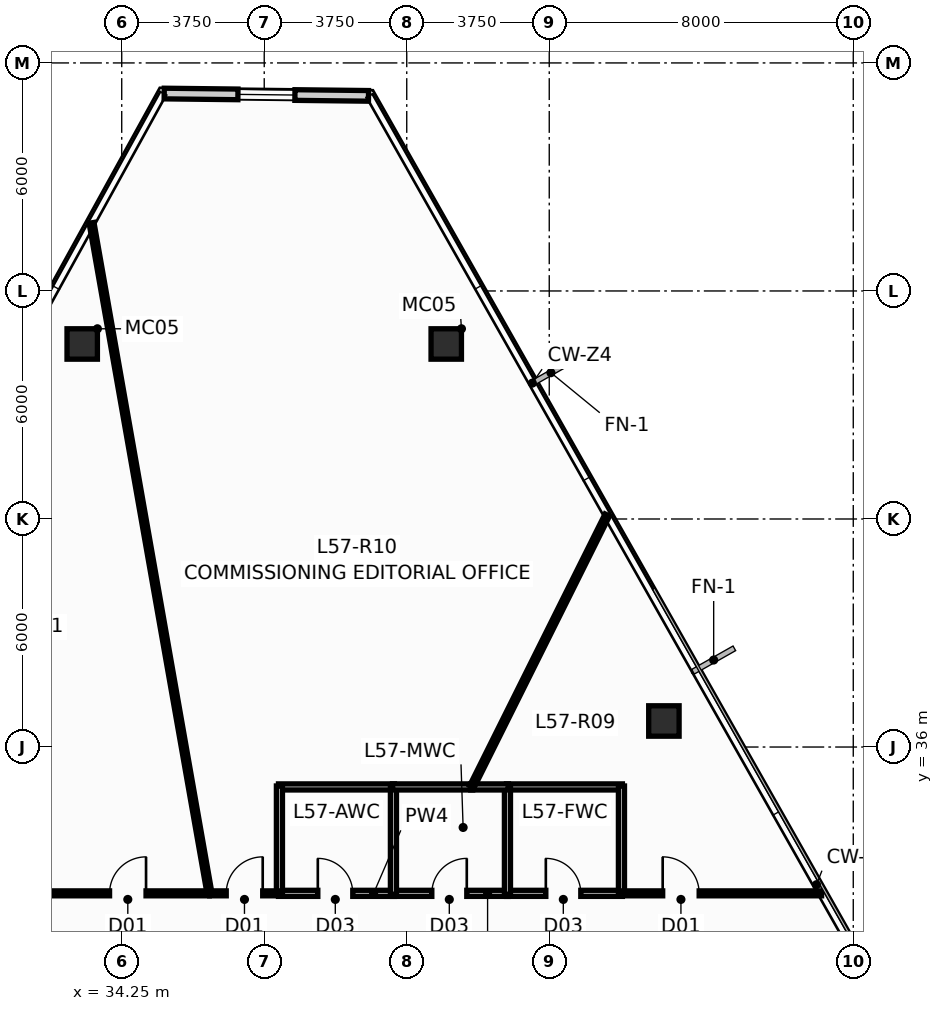
"""IFC4 building model, lengths in metres.
Left out: names, types, materials, properties, quantities, classifications, styles, units other than length and angle.
Written with IfcOpenShell. Run it as: python <this file> out.ifc"""

import sys

from ifc_helpers import new_model, si_unit, direction, frame, frame_2d, origin, origin_2d, place, context, subcontext, project, spatial, rectangle, hollow_rectangle, extrude, source, transform, mapped, element, fill, save


model = new_model("IFC4")
c1 = context("Model", 3, precision=1e-05, world=origin(), true_north=direction((0.0, 1.0)))
c2 = subcontext(c1, "Body", "Model", "MODEL_VIEW")
j1 = project(units=[si_unit("LENGTHUNIT", "METRE"), si_unit("PLANEANGLEUNIT", "RADIAN")], contexts=[c1])
p1 = place(None, origin())
s1 = spatial("IfcSite", under=j1, at=p1, CompositionType="ELEMENT")
p2 = place(p1, origin())
s2 = spatial("IfcBuilding", under=s1, at=p2, CompositionType="ELEMENT")
p3 = place(p2, frame((0.0, 0.0, 216.9)))
s3 = spatial("IfcBuildingStorey", under=s2, at=p3, CompositionType="ELEMENT", Elevation=216.9)
m1 = source(origin(), c2, "Body", "SweptSolid", [
    extrude(hollow_rectangle(XDim=0.8, YDim=0.8, WallThickness=0.045, at=origin_2d()), origin(), (0.0, 0.0, 1.0), 3.651),
])
for number, where, z_axis, x_axis in (
    (1, (42.79, 46.605, 0.0), (-0.024, 0.002, 1.0), (-0.073, -0.997, 0.0)),
    (2, (33.21, 46.605, 0.0), (0.024, 0.002, 1.0), (-0.073, 0.997, 0.0)),
):
    element("IfcColumn", number, at=place(p3, frame(where, z_axis=z_axis, x_axis=x_axis)), inside=s3, PredefinedType="COLUMN", context=c2, shape_type="MappedRepresentation", body=[
        mapped(m1, transform((0.0, 0.0, 0.0), scale=1.0)),
    ])
m2 = source(origin(), c2, "Body", "SweptSolid", [
    extrude(hollow_rectangle(XDim=0.8, YDim=0.8, WallThickness=0.045, at=origin_2d()), origin(), (0.0, 0.0, 1.0), 3.651),
])
p4 = place(p3, frame((48.517, 36.685, 0.0), z_axis=(-0.019392689002, -0.006085292066, 0.99979342508), x_axis=(0.299398805134, -0.954128060317, 0.0)))
e3 = element("IfcColumn", 3, at=p4, inside=s3, PredefinedType="COLUMN", context=c2, shape_type="MappedRepresentation", body=[
    mapped(m2, transform((0.0, 0.0, 0.0), scale=1.0)),
])
p5 = place(p3, frame((35.368, 53.195, 0.0), z_axis=(0.0, 0.0, 1.0), x_axis=(0.999935040825, -0.011397987977, 0.0)))
e4 = element("IfcWall", 4, at=p5, inside=s3, PredefinedType="STANDARD", context=c2, shape_type="SweptSolid", body=[
    extrude(rectangle(XDim=5.376, YDim=0.28, at=frame_2d((2.688, 0.0))), origin(), (0.0, 0.0, 1.0), 3.25),
])
p6 = place(p5, frame((1.94, 0.0, 0.9)))
e5 = element("IfcOpeningElement", 5, at=p6, cuts=e4, PredefinedType="OPENING", context=c2, shape_type="SweptSolid", body=[
    extrude(rectangle(XDim=1.5, YDim=1.8, at=frame_2d((0.75, 0.9))), frame((0.0, 0.152, 0.0), z_axis=(0.0, -1.0, 0.0), x_axis=(1.0, 0.0, 0.0)), (0.0, 0.0, 1.0), 0.304),
])
p7 = place(p3, frame((38.375, 32.15, 0.0), z_axis=(0.0, 0.0, 1.0), x_axis=(1.0, 0.0, 0.0)))
e6 = element("IfcWall", 6, at=p7, inside=s3, PredefinedType="PLUMBINGWALL", context=c2, shape_type="SweptSolid", body=[
    extrude(rectangle(XDim=3.05, YDim=0.16, at=frame_2d((1.525, 0.0))), origin(), (0.0, 0.0, 1.0), 2.928),
])
p8 = place(p7, frame((1.035, 0.0, 0.0)))
e7 = element("IfcOpeningElement", 7, at=p8, cuts=e6, PredefinedType="OPENING", context=c2, shape_type="SweptSolid", body=[
    extrude(rectangle(XDim=0.92, YDim=2.1, at=frame_2d((0.46, 1.05))), frame((0.0, 0.092, 0.0), z_axis=(0.0, -1.0, 0.0), x_axis=(1.0, 0.0, 0.0)), (0.0, 0.0, 1.0), 0.184),
])
p9 = place(p3, frame((41.375, 32.15, 0.0), z_axis=(0.0, 0.0, 1.0), x_axis=(1.0, 0.0, 0.0)))
e8 = element("IfcWall", 8, at=p9, inside=s3, PredefinedType="PLUMBINGWALL", context=c2, shape_type="SweptSolid", body=[
    extrude(rectangle(XDim=3.05, YDim=0.16, at=frame_2d((1.525, 0.0))), origin(), (0.0, 0.0, 1.0), 2.928),
])
p10 = place(p9, frame((1.035, 0.0, 0.0)))
e9 = element("IfcOpeningElement", 9, at=p10, cuts=e8, PredefinedType="OPENING", context=c2, shape_type="SweptSolid", body=[
    extrude(rectangle(XDim=0.92, YDim=2.1, at=frame_2d((0.46, 1.05))), frame((0.0, 0.092, 0.0), z_axis=(0.0, -1.0, 0.0), x_axis=(1.0, 0.0, 0.0)), (0.0, 0.0, 1.0), 0.184),
])
p11 = place(p3, frame((44.375, 32.15, 0.0), z_axis=(0.0, 0.0, 1.0), x_axis=(1.0, 0.0, 0.0)))
e10 = element("IfcWall", 10, at=p11, inside=s3, PredefinedType="PLUMBINGWALL", context=c2, shape_type="SweptSolid", body=[
    extrude(rectangle(XDim=3.05, YDim=0.16, at=frame_2d((1.525, 0.0))), origin(), (0.0, 0.0, 1.0), 2.928),
])
p12 = place(p11, frame((1.035, 0.0, 0.0)))
e11 = element("IfcOpeningElement", 11, at=p12, cuts=e10, PredefinedType="OPENING", context=c2, shape_type="SweptSolid", body=[
    extrude(rectangle(XDim=0.92, YDim=2.1, at=frame_2d((0.46, 1.05))), frame((0.0, 0.092, 0.0), z_axis=(0.0, -1.0, 0.0), x_axis=(1.0, 0.0, 0.0)), (0.0, 0.0, 1.0), 0.184),
])
for number, where, z_axis, x_axis in (
    (12, (38.375, 34.95, 0.0), (0.0, 0.0, 1.0), (1.0, 0.0, 0.0)),
    (13, (47.425, 34.95, 0.0), (0.0, 0.0, 1.0), (-1.0, 0.0, 0.0)),
):
    element("IfcWall", number, at=place(p3, frame(where, z_axis=z_axis, x_axis=x_axis)), inside=s3, PredefinedType="PLUMBINGWALL", context=c2, shape_type="SweptSolid", body=[
        extrude(rectangle(XDim=3.05, YDim=0.16, at=frame_2d((1.525, 0.0))), origin(), (0.0, 0.0, 1.0), 2.928),
    ])
for number, where, z_axis, x_axis in (
    (14, (41.4, 32.125, 0.0), (0.0, 0.0, 1.0), (0.0, 1.0, 0.0)),
    (15, (38.4, 32.125, 0.0), (0.0, 0.0, 1.0), (0.0, 1.0, 0.0)),
):
    element("IfcWall", number, at=place(p3, frame(where, z_axis=z_axis, x_axis=x_axis)), inside=s3, PredefinedType="PLUMBINGWALL", context=c2, shape_type="SweptSolid", body=[
        extrude(rectangle(XDim=2.85, YDim=0.16, at=frame_2d((1.425, 0.0))), origin(), (0.0, 0.0, 1.0), 3.25),
    ])
p13 = place(p3, frame((44.4, 32.125, 0.0), z_axis=(0.0, 0.0, 1.0), x_axis=(0.0, 1.0, 0.0)))
e16 = element("IfcWall", 16, at=p13, inside=s3, PredefinedType="PLUMBINGWALL", context=c2, shape_type="SweptSolid", body=[
    extrude(rectangle(XDim=2.85, YDim=0.16, at=frame_2d((1.425, 0.0))), origin(), (0.0, 0.0, 1.0), 2.775),
])
p14 = place(p3, frame((47.4, 32.125, 0.0), z_axis=(0.0, 0.0, 1.0), x_axis=(0.0, 1.0, 0.0)))
e17 = element("IfcWall", 17, at=p14, inside=s3, PredefinedType="PLUMBINGWALL", context=c2, shape_type="SweptSolid", body=[
    extrude(rectangle(XDim=2.85, YDim=0.16, at=frame_2d((1.425, 0.0))), origin(), (0.0, 0.0, 1.0), 3.25),
])
p15 = place(p3, frame((41.375, 34.95, 0.0), z_axis=(0.0, 0.0, 1.0), x_axis=(1.0, 0.0, 0.0)))
e18 = element("IfcWall", 18, at=p15, inside=s3, PredefinedType="PLUMBINGWALL", context=c2, shape_type="SweptSolid", body=[
    extrude(rectangle(XDim=2.11, YDim=0.16, at=frame_2d((1.055, 0.0))), origin(), (0.0, 0.0, 1.0), 2.928),
])
p16 = place(p3, frame((43.435, 34.95, 0.0), z_axis=(0.0, 0.0, 1.0), x_axis=(1.0, 0.0, 0.0)))
e19 = element("IfcWall", 19, at=p16, inside=s3, PredefinedType="PLUMBINGWALL", context=c2, shape_type="SweptSolid", body=[
    extrude(rectangle(XDim=0.99, YDim=0.16, at=frame_2d((0.495, 0.0))), origin(), (0.0, 0.0, 1.0), 2.928),
])
p17 = place(p3, frame((33.456, 49.792, 0.0), z_axis=(0.0, 0.0, 1.0), x_axis=(0.173275126194, -0.984873459203, 0.0)))
e20 = element("IfcWall", 20, at=p17, inside=s3, PredefinedType="PARTITIONING", context=c2, shape_type="SweptSolid", body=[
    extrude(rectangle(XDim=17.908, YDim=0.13, at=frame_2d((8.954, 0.0))), origin(), (0.0, 0.0, 1.0), 3.25),
])
p18 = place(p3, frame((43.462, 34.954, 0.0), z_axis=(0.0, 0.0, 1.0), x_axis=(0.446235545648, 0.894915547859, 0.0)))
e21 = element("IfcWall", 21, at=p18, inside=s3, PredefinedType="PARTITIONING", context=c2, shape_type="SweptSolid", body=[
    extrude(rectangle(XDim=7.99, YDim=0.13, at=frame_2d((3.995, 0.0))), origin(), (0.0, 0.0, 1.0), 3.25),
])
p19 = place(p3, frame((47.405, 32.15, 0.0), z_axis=(0.0, 0.0, 1.0), x_axis=(1.0, 0.0, 0.0)))
e22 = element("IfcWall", 22, at=p19, inside=s3, PredefinedType="PARTITIONING", context=c2, shape_type="SweptSolid", body=[
    extrude(rectangle(XDim=5.262, YDim=0.13, at=frame_2d((2.631, 0.0))), origin(), (0.0, 0.0, 1.0), 3.25),
])
p20 = place(p19, frame((1.08, 0.0, 0.0)))
e23 = element("IfcOpeningElement", 23, at=p20, cuts=e22, PredefinedType="OPENING", context=c2, shape_type="SweptSolid", body=[
    extrude(rectangle(XDim=0.96, YDim=2.15, at=frame_2d((0.48, 1.075))), frame((0.0, 0.077, 0.0), z_axis=(0.0, -1.0, 0.0), x_axis=(1.0, 0.0, 0.0)), (0.0, 0.0, 1.0), 0.154),
])
p21 = place(p3, frame((32.265, 32.15, 0.0), z_axis=(0.0, 0.0, 1.0), x_axis=(1.0, 0.0, 0.0)))
e24 = element("IfcWall", 24, at=p21, inside=s3, PredefinedType="PARTITIONING", context=c2, shape_type="SweptSolid", body=[
    extrude(rectangle(XDim=4.29, YDim=0.13, at=frame_2d((2.145, 0.0))), origin(), (0.0, 0.0, 1.0), 2.928),
])
p22 = place(p21, frame((1.665, 0.0, 0.0)))
e25 = element("IfcOpeningElement", 25, at=p22, cuts=e24, PredefinedType="OPENING", context=c2, shape_type="SweptSolid", body=[
    extrude(rectangle(XDim=0.96, YDim=2.15, at=frame_2d((0.48, 1.075))), frame((0.0, 0.077, 0.0), z_axis=(0.0, -1.0, 0.0), x_axis=(1.0, 0.0, 0.0)), (0.0, 0.0, 1.0), 0.154),
])
p23 = place(p3, frame((36.565, 32.15, 0.0), z_axis=(0.0, 0.0, 1.0), x_axis=(1.0, 0.0, 0.0)))
e26 = element("IfcWall", 26, at=p23, inside=s3, PredefinedType="PARTITIONING", context=c2, shape_type="SweptSolid", body=[
    extrude(rectangle(XDim=1.83, YDim=0.13, at=frame_2d((0.915, 0.0))), origin(), (0.0, 0.0, 1.0), 2.928),
])
p24 = place(p23, frame((0.435, 0.0, 0.0)))
e27 = element("IfcOpeningElement", 27, at=p24, cuts=e26, PredefinedType="OPENING", context=c2, shape_type="SweptSolid", body=[
    extrude(rectangle(XDim=0.96, YDim=2.15, at=frame_2d((0.48, 1.075))), frame((0.0, 0.077, 0.0), z_axis=(0.0, -1.0, 0.0), x_axis=(1.0, 0.0, 0.0)), (0.0, 0.0, 1.0), 0.154),
])
p25 = place(p6, origin())
e28 = element("IfcWindow", 28, at=p25, inside=s3, PartitioningType="SINGLE_PANEL", PredefinedType="WINDOW", context=c2, shape_type="SweptSolid", body=[
    extrude(rectangle(XDim=1.5, YDim=1.8, at=frame_2d((0.75, 0.9))), frame((0.0, 0.03, 0.0), z_axis=(0.0, -1.0, 0.0), x_axis=(1.0, 0.0, 0.0)), (0.0, 0.0, 1.0), 0.06),
])
fill(e5, e28)
p26 = place(p8, origin())
e29 = element("IfcDoor", 29, at=p26, inside=s3, OperationType="SINGLE_SWING_LEFT", PredefinedType="DOOR", context=c2, shape_type="SweptSolid", body=[
    extrude(rectangle(XDim=0.92, YDim=2.1, at=frame_2d((0.46, 1.05))), frame((0.0, 0.025, 0.0), z_axis=(0.0, -1.0, 0.0), x_axis=(1.0, 0.0, 0.0)), (0.0, 0.0, 1.0), 0.05),
])
fill(e7, e29)
p27 = place(p10, origin())
e30 = element("IfcDoor", 30, at=p27, inside=s3, OperationType="SINGLE_SWING_RIGHT", PredefinedType="DOOR", context=c2, shape_type="SweptSolid", body=[
    extrude(rectangle(XDim=0.92, YDim=2.1, at=frame_2d((0.46, 1.05))), frame((0.0, 0.025, 0.0), z_axis=(0.0, -1.0, 0.0), x_axis=(1.0, 0.0, 0.0)), (0.0, 0.0, 1.0), 0.05),
])
fill(e9, e30)
p28 = place(p12, origin())
e31 = element("IfcDoor", 31, at=p28, inside=s3, OperationType="SINGLE_SWING_LEFT", PredefinedType="DOOR", context=c2, shape_type="SweptSolid", body=[
    extrude(rectangle(XDim=0.92, YDim=2.1, at=frame_2d((0.46, 1.05))), frame((0.0, 0.025, 0.0), z_axis=(0.0, -1.0, 0.0), x_axis=(1.0, 0.0, 0.0)), (0.0, 0.0, 1.0), 0.05),
])
fill(e11, e31)
p29 = place(p20, origin())
e32 = element("IfcDoor", 32, at=p29, inside=s3, OperationType="SINGLE_SWING_LEFT", PredefinedType="DOOR", context=c2, shape_type="SweptSolid", body=[
    extrude(rectangle(XDim=0.96, YDim=2.15, at=frame_2d((0.48, 1.075))), frame((0.0, 0.025, 0.0), z_axis=(0.0, -1.0, 0.0), x_axis=(1.0, 0.0, 0.0)), (0.0, 0.0, 1.0), 0.05),
])
fill(e23, e32)
p30 = place(p22, origin())
e33 = element("IfcDoor", 33, at=p30, inside=s3, OperationType="SINGLE_SWING_RIGHT", PredefinedType="DOOR", context=c2, shape_type="SweptSolid", body=[
    extrude(rectangle(XDim=0.96, YDim=2.15, at=frame_2d((0.48, 1.075))), frame((0.0, 0.025, 0.0), z_axis=(0.0, -1.0, 0.0), x_axis=(1.0, 0.0, 0.0)), (0.0, 0.0, 1.0), 0.05),
])
fill(e25, e33)
p31 = place(p24, origin())
e34 = element("IfcDoor", 34, at=p31, inside=s3, OperationType="SINGLE_SWING_RIGHT", PredefinedType="DOOR", context=c2, shape_type="SweptSolid", body=[
    extrude(rectangle(XDim=0.96, YDim=2.15, at=frame_2d((0.48, 1.075))), frame((0.0, 0.025, 0.0), z_axis=(0.0, -1.0, 0.0), x_axis=(1.0, 0.0, 0.0)), (0.0, 0.0, 1.0), 0.05),
])
fill(e27, e34)
save(model, sys.argv[1])
